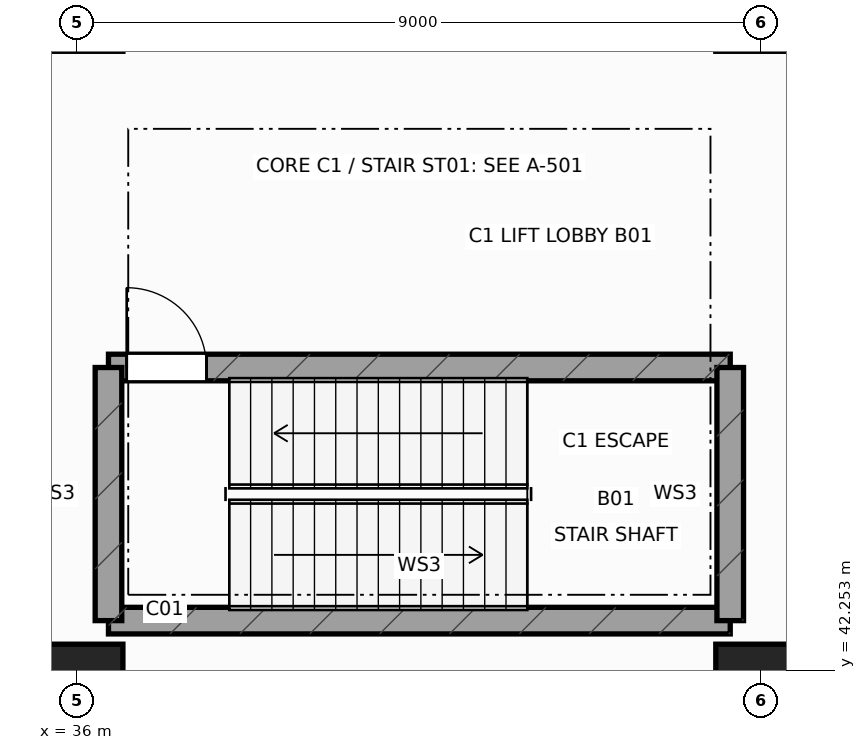
"""IFC4 building model, lengths in metres.
Left out: names, types, materials, properties, quantities, classifications, styles, units other than length and angle.
Written with IfcOpenShell. Run it as: python <this file> out.ifc"""

import sys

from ifc_helpers import new_model, si_unit, direction, frame, frame_2d, origin, origin_2d, place, context, subcontext, project, spatial, rectangle, extrude, element, fill, save


model = new_model("IFC4")
c1 = context("Model", 3, precision=1e-05, world=origin(), true_north=direction((0.0, 1.0)))
c2 = subcontext(c1, "Body", "Model", "MODEL_VIEW")
j1 = project(units=[si_unit("LENGTHUNIT", "METRE"), si_unit("PLANEANGLEUNIT", "RADIAN")], contexts=[c1])
p1 = place(None, origin())
s1 = spatial("IfcSite", under=j1, at=p1, CompositionType="ELEMENT")
p2 = place(p1, origin())
s2 = spatial("IfcBuilding", under=s1, at=p2, CompositionType="ELEMENT")
p3 = place(p2, frame((0.0, 0.0, -5.4)))
s3 = spatial("IfcBuildingStorey", under=s2, at=p3, CompositionType="ELEMENT", Elevation=-5.4)
for number, where, z_axis, x_axis in (
    (1, (36.0, 42.0, 0.0), (0.0, 0.0, 1.0), (1.0, 0.0, 0.0)),
    (2, (45.0, 42.0, 0.0), (0.0, 0.0, 1.0), (1.0, 0.0, 0.0)),
):
    element("IfcColumn", number, at=place(p3, frame(where, z_axis=z_axis, x_axis=x_axis)), inside=s3, PredefinedType="COLUMN", context=c2, shape_type="SweptSolid", body=[
        extrude(rectangle(XDim=1.2, YDim=1.2, at=origin_2d()), origin(), (0.0, 0.0, 1.0), 5.4),
    ])
p4 = place(p3, frame((36.41, 42.91, 0.0), z_axis=(0.0, 0.0, 1.0), x_axis=(1.0, 0.0, 0.0)))
e3 = element("IfcWall", 3, at=p4, inside=s3, PredefinedType="SHEAR", context=c2, shape_type="SweptSolid", body=[
    extrude(rectangle(XDim=8.18, YDim=0.35, at=frame_2d((4.09, 0.0))), origin(), (0.0, 0.0, 1.0), 5.08),
])
p5 = place(p3, frame((36.41, 46.24, 0.0), z_axis=(0.0, 0.0, 1.0), x_axis=(1.0, 0.0, 0.0)))
e4 = element("IfcWall", 4, at=p5, inside=s3, PredefinedType="SHEAR", context=c2, shape_type="SweptSolid", body=[
    extrude(rectangle(XDim=8.18, YDim=0.35, at=frame_2d((4.09, 0.0))), origin(), (0.0, 0.0, 1.0), 5.08),
])
p6 = place(p5, frame((0.24, 0.0, 0.0)))
e5 = element("IfcOpeningElement", 5, at=p6, cuts=e4, PredefinedType="OPENING", context=c2, shape_type="SweptSolid", body=[
    extrude(rectangle(XDim=1.05, YDim=2.18, at=frame_2d((0.525, 1.09))), frame((0.0, 0.185, 0.0), z_axis=(0.0, -1.0, 0.0), x_axis=(1.0, 0.0, 0.0)), (0.0, 0.0, 1.0), 0.37),
])
for number, where, z_axis, x_axis in (
    (6, (36.41, 42.91, 0.0), (0.0, 0.0, 1.0), (0.0, 1.0, 0.0)),
    (7, (44.59, 42.91, 0.0), (0.0, 0.0, 1.0), (0.0, 1.0, 0.0)),
):
    element("IfcWall", number, at=place(p3, frame(where, z_axis=z_axis, x_axis=x_axis)), inside=s3, PredefinedType="SHEAR", context=c2, shape_type="SweptSolid", body=[
        extrude(rectangle(XDim=3.33, YDim=0.35, at=frame_2d((1.665, 0.0))), origin(), (0.0, 0.0, 1.0), 5.08),
    ])
p7 = place(p6, origin())
e8 = element("IfcDoor", 8, at=p7, inside=s3, OperationType="SINGLE_SWING_LEFT", PredefinedType="DOOR", context=c2, shape_type="SweptSolid", body=[
    extrude(rectangle(XDim=1.05, YDim=2.18, at=frame_2d((0.525, 1.09))), frame((0.0, 0.025, 0.0), z_axis=(0.0, -1.0, 0.0), x_axis=(1.0, 0.0, 0.0)), (0.0, 0.0, 1.0), 0.05),
])
fill(e5, e8)
save(model, sys.argv[1])
